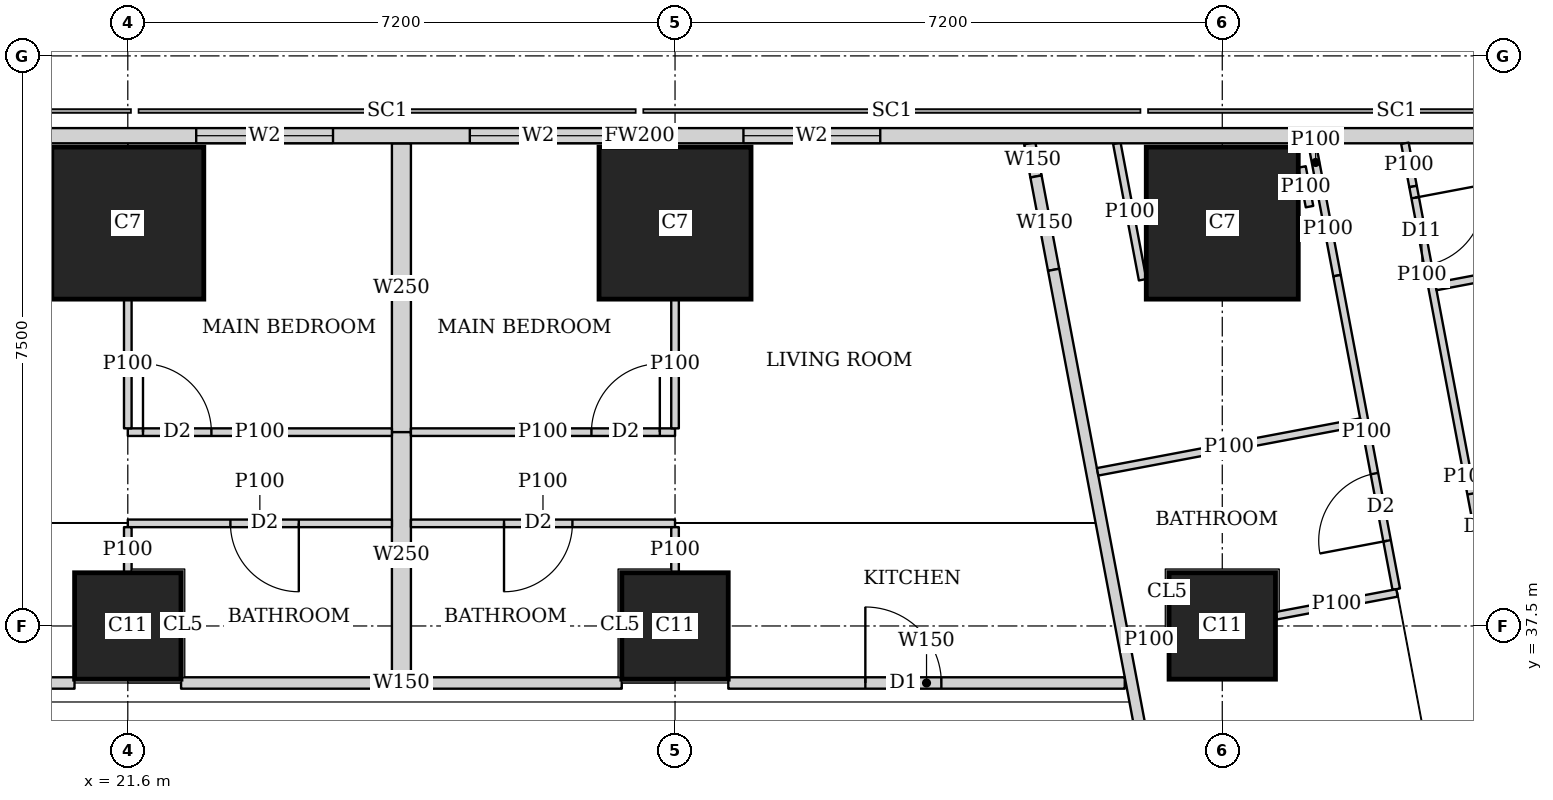
"""IFC4 building model, lengths in metres.
Left out: names, types, materials, properties, quantities, classifications, styles, units other than length and angle.
Written with IfcOpenShell. Run it as: python <this file> out.ifc"""

import sys

from ifc_helpers import new_model, si_unit, direction, frame, frame_2d, origin, origin_2d, place, context, subcontext, project, spatial, rectangle, extrude, element, fill, save


model = new_model("IFC4")
c1 = context("Model", 3, precision=1e-05, world=origin(), true_north=direction((0.0, 1.0)))
c2 = subcontext(c1, "Body", "Model", "MODEL_VIEW")
j1 = project(units=[si_unit("LENGTHUNIT", "METRE"), si_unit("PLANEANGLEUNIT", "RADIAN")], contexts=[c1])
p1 = place(None, origin())
s1 = spatial("IfcSite", under=j1, at=p1, CompositionType="ELEMENT")
p2 = place(p1, origin())
s2 = spatial("IfcBuilding", under=s1, at=p2, CompositionType="ELEMENT")
p3 = place(p2, frame((0.0, 0.0, 255.35)))
s3 = spatial("IfcBuildingStorey", under=s2, at=p3, CompositionType="ELEMENT", Elevation=255.35)
for number, where, z_axis, x_axis in (
    (1, (21.6, 37.5, 0.0), (0.0, 0.0, 1.0), (1.0, 0.0, 0.0)),
    (2, (28.8, 37.5, 0.0), (0.0, 0.0, 1.0), (1.0, 0.0, 0.0)),
    (3, (36.0, 37.5, 0.0), (0.0, 0.0, 1.0), (1.0, 0.0, 0.0)),
):
    element("IfcColumn", number, at=place(p3, frame(where, z_axis=z_axis, x_axis=x_axis)), inside=s3, PredefinedType="COLUMN", context=c2, shape_type="SweptSolid", body=[
        extrude(rectangle(XDim=1.4, YDim=1.4, at=origin_2d()), origin(), (0.0, 0.0, 1.0), 3.75),
    ])
for number, where, z_axis, x_axis in (
    (4, (21.6, 42.8, 0.0), (0.0, 0.0, 1.0), (1.0, 0.0, 0.0)),
    (5, (28.8, 42.8, 0.0), (0.0, 0.0, 1.0), (1.0, 0.0, 0.0)),
    (6, (36.0, 42.8, 0.0), (0.0, 0.0, 1.0), (1.0, 0.0, 0.0)),
):
    element("IfcColumn", number, at=place(p3, frame(where, z_axis=z_axis, x_axis=x_axis)), inside=s3, PredefinedType="COLUMN", context=c2, shape_type="SweptSolid", body=[
        extrude(rectangle(XDim=2.0, YDim=2.0, at=origin_2d()), origin(), (0.0, 0.0, 1.0), 3.75),
    ])
p4 = place(p3, frame((42.103, 43.95, 0.0), z_axis=(0.0, 0.0, 1.0), x_axis=(-1.0, 0.0, 0.0)))
e7 = element("IfcWall", 7, at=p4, inside=s3, PredefinedType="SOLIDWALL", context=c2, shape_type="SweptSolid", body=[
    extrude(rectangle(XDim=27.54, YDim=0.2, at=frame_2d((13.77, 0.0))), origin(), (0.0, 0.0, 1.0), 3.5),
])
p5 = place(p4, frame((10.603, 0.0, 0.9)))
e8 = element("IfcOpeningElement", 8, at=p5, cuts=e7, PredefinedType="OPENING", context=c2, shape_type="SweptSolid", body=[
    extrude(rectangle(XDim=1.8, YDim=1.5, at=frame_2d((0.9, 0.75))), frame((0.0, 0.11, 0.0), z_axis=(0.0, -1.0, 0.0), x_axis=(1.0, 0.0, 0.0)), (0.0, 0.0, 1.0), 0.22),
])
p6 = place(p4, frame((14.203, 0.0, 0.9)))
e9 = element("IfcOpeningElement", 9, at=p6, cuts=e7, PredefinedType="OPENING", context=c2, shape_type="SweptSolid", body=[
    extrude(rectangle(XDim=1.8, YDim=1.5, at=frame_2d((0.9, 0.75))), frame((0.0, 0.11, 0.0), z_axis=(0.0, -1.0, 0.0), x_axis=(1.0, 0.0, 0.0)), (0.0, 0.0, 1.0), 0.22),
])
p7 = place(p4, frame((17.803, 0.0, 0.9)))
e10 = element("IfcOpeningElement", 10, at=p7, cuts=e7, PredefinedType="OPENING", context=c2, shape_type="SweptSolid", body=[
    extrude(rectangle(XDim=1.8, YDim=1.5, at=frame_2d((0.9, 0.75))), frame((0.0, 0.11, 0.0), z_axis=(0.0, -1.0, 0.0), x_axis=(1.0, 0.0, 0.0)), (0.0, 0.0, 1.0), 0.22),
])
p8 = place(p4, frame((22.822, 0.0, 0.9)))
e11 = element("IfcOpeningElement", 11, at=p8, cuts=e7, PredefinedType="OPENING", context=c2, shape_type="SweptSolid", body=[
    extrude(rectangle(XDim=2.4, YDim=1.5, at=frame_2d((1.2, 0.75))), frame((0.0, 0.11, 0.0), z_axis=(0.0, -1.0, 0.0), x_axis=(1.0, 0.0, 0.0)), (0.0, 0.0, 1.0), 0.22),
])
p9 = place(p3, frame((16.001, 36.75, 0.0), z_axis=(0.0, 0.0, 1.0), x_axis=(1.0, 0.0, 0.0)))
e12 = element("IfcWall", 12, at=p9, inside=s3, PredefinedType="SOLIDWALL", context=c2, shape_type="SweptSolid", body=[
    extrude(rectangle(XDim=4.898, YDim=0.15, at=frame_2d((2.449, 0.0))), origin(), (0.0, 0.0, 1.0), 3.5),
])
p10 = place(p9, frame((1.074, 0.0, 0.0)))
e13 = element("IfcOpeningElement", 13, at=p10, cuts=e12, PredefinedType="OPENING", context=c2, shape_type="SweptSolid", body=[
    extrude(rectangle(XDim=1.0, YDim=2.1, at=frame_2d((0.5, 1.05))), frame((0.0, 0.085, 0.0), z_axis=(0.0, -1.0, 0.0), x_axis=(1.0, 0.0, 0.0)), (0.0, 0.0, 1.0), 0.17),
])
p11 = place(p3, frame((22.301, 36.75, 0.0), z_axis=(0.0, 0.0, 1.0), x_axis=(1.0, 0.0, 0.0)))
e14 = element("IfcWall", 14, at=p11, inside=s3, PredefinedType="SOLIDWALL", context=c2, shape_type="SweptSolid", body=[
    extrude(rectangle(XDim=5.798, YDim=0.15, at=frame_2d((2.899, 0.0))), origin(), (0.0, 0.0, 1.0), 3.5),
])
p12 = place(p3, frame((29.501, 36.75, 0.0), z_axis=(0.0, 0.0, 1.0), x_axis=(1.0, 0.0, 0.0)))
e15 = element("IfcWall", 15, at=p12, inside=s3, PredefinedType="SOLIDWALL", context=c2, shape_type="SweptSolid", body=[
    extrude(rectangle(XDim=5.216, YDim=0.15, at=frame_2d((2.608, 0.0))), origin(), (0.0, 0.0, 1.0), 3.5),
])
p13 = place(p12, frame((1.803, 0.0, 0.0)))
e16 = element("IfcOpeningElement", 16, at=p13, cuts=e15, PredefinedType="OPENING", context=c2, shape_type="SweptSolid", body=[
    extrude(rectangle(XDim=1.0, YDim=2.1, at=frame_2d((0.5, 1.05))), frame((0.0, 0.085, 0.0), z_axis=(0.0, -1.0, 0.0), x_axis=(1.0, 0.0, 0.0)), (0.0, 0.0, 1.0), 0.17),
])
p14 = place(p3, frame((33.467, 43.85, 0.0), z_axis=(0.0, 0.0, 1.0), x_axis=(0.184886516626, -0.982759877066, 0.0)))
e17 = element("IfcWall", 17, at=p14, inside=s3, PredefinedType="SOLIDWALL", context=c2, shape_type="SweptSolid", body=[
    extrude(rectangle(XDim=0.444, YDim=0.15, at=frame_2d((0.222, 0.0))), origin(), (0.0, 0.0, 1.0), 3.5),
])
p15 = place(p3, frame((33.549, 43.414, 0.0), z_axis=(0.0, 0.0, 1.0), x_axis=(0.185585816539, -0.982628060204, 0.0)))
e18 = element("IfcWall", 18, at=p15, inside=s3, PredefinedType="SOLIDWALL", context=c2, shape_type="SweptSolid", body=[
    extrude(rectangle(XDim=1.25, YDim=0.15, at=frame_2d((0.625, 0.0))), origin(), (0.0, 0.0, 1.0), 2.05),
])
p16 = place(p3, frame((33.781, 42.186, 0.0), z_axis=(0.0, 0.0, 1.0), x_axis=(0.185593518645, -0.9826266055, 0.0)))
e19 = element("IfcWall", 19, at=p16, inside=s3, PredefinedType="SOLIDWALL", context=c2, shape_type="SweptSolid", body=[
    extrude(rectangle(XDim=35.961, YDim=0.15, at=frame_2d((17.98, 0.0))), origin(), (0.0, 0.0, 1.0), 2.5),
])
p17 = place(p16, frame((7.183, 0.0, 0.0)))
e20 = element("IfcOpeningElement", 20, at=p17, cuts=e19, PredefinedType="OPENING", context=c2, shape_type="SweptSolid", body=[
    extrude(rectangle(XDim=1.0, YDim=2.1, at=frame_2d((0.5, 1.05))), frame((0.0, 0.085, 0.0), z_axis=(0.0, -1.0, 0.0), x_axis=(1.0, 0.0, 0.0)), (0.0, 0.0, 1.0), 0.17),
])
p18 = place(p16, frame((11.76, 0.0, 0.0)))
e21 = element("IfcOpeningElement", 21, at=p18, cuts=e19, PredefinedType="OPENING", context=c2, shape_type="SweptSolid", body=[
    extrude(rectangle(XDim=1.0, YDim=2.1, at=frame_2d((0.5, 1.05))), frame((0.0, 0.085, 0.0), z_axis=(0.0, -1.0, 0.0), x_axis=(1.0, 0.0, 0.0)), (0.0, 0.0, 1.0), 0.17),
])
p19 = place(p16, frame((23.863, 0.0, 0.0)))
e22 = element("IfcOpeningElement", 22, at=p19, cuts=e19, PredefinedType="OPENING", context=c2, shape_type="SweptSolid", body=[
    extrude(rectangle(XDim=1.0, YDim=2.1, at=frame_2d((0.5, 1.05))), frame((0.0, 0.085, 0.0), z_axis=(0.0, -1.0, 0.0), x_axis=(1.0, 0.0, 0.0)), (0.0, 0.0, 1.0), 0.17),
])
p20 = place(p16, frame((30.502, 0.0, 0.0)))
e23 = element("IfcOpeningElement", 23, at=p20, cuts=e19, PredefinedType="OPENING", context=c2, shape_type="SweptSolid", body=[
    extrude(rectangle(XDim=1.0, YDim=2.1, at=frame_2d((0.5, 1.05))), frame((0.0, 0.085, 0.0), z_axis=(0.0, -1.0, 0.0), x_axis=(1.0, 0.0, 0.0)), (0.0, 0.0, 1.0), 0.17),
])
p21 = place(p3, frame((34.952, 42.055, 0.0), z_axis=(0.0, 0.0, 1.0), x_axis=(-0.185490642006, 0.98264603074, 0.0)))
e24 = element("IfcWall", 24, at=p21, inside=s3, PredefinedType="PARTITIONING", context=c2, shape_type="SweptSolid", body=[
    extrude(rectangle(XDim=1.827, YDim=0.1, at=frame_2d((0.914, 0.0))), origin(), (0.0, 0.0, 1.0), 2.05),
])
p22 = place(p3, frame((37.049, 43.539, 0.0), z_axis=(0.0, 0.0, 1.0), x_axis=(0.186119495745, -0.982527115811, 0.0)))
e25 = element("IfcWall", 25, at=p22, inside=s3, PredefinedType="PARTITIONING", context=c2, shape_type="SweptSolid", body=[
    extrude(rectangle(XDim=0.531, YDim=0.1, at=frame_2d((0.266, 0.0))), origin(), (0.0, 0.0, 1.0), 2.05),
])
p23 = place(p3, frame((38.403, 43.85, 0.0), z_axis=(0.0, 0.0, 1.0), x_axis=(0.184976954078, -0.982742858768, 0.0)))
e26 = element("IfcWall", 26, at=p23, inside=s3, PredefinedType="PARTITIONING", context=c2, shape_type="SweptSolid", body=[
    extrude(rectangle(XDim=0.578, YDim=0.1, at=frame_2d((0.289, 0.0))), origin(), (0.0, 0.0, 1.0), 3.5),
])
p24 = place(p3, frame((38.51, 43.282, 0.0), z_axis=(0.0, 0.0, 1.0), x_axis=(0.185775287495, -0.982592256511, 0.0)))
e27 = element("IfcWall", 27, at=p24, inside=s3, PredefinedType="PARTITIONING", context=c2, shape_type="SweptSolid", body=[
    extrude(rectangle(XDim=1.259, YDim=0.1, at=frame_2d((0.629, 0.0))), origin(), (0.0, 0.0, 1.0), 2.05),
])
p25 = place(p24, frame((0.15, 0.0, 0.0)))
e28 = element("IfcOpeningElement", 28, at=p25, cuts=e27, PredefinedType="OPENING", context=c2, shape_type="SweptSolid", body=[
    extrude(rectangle(XDim=0.9, YDim=2.0, at=frame_2d((0.45, 1.0))), frame((0.0, 0.06, 0.0), z_axis=(0.0, -1.0, 0.0), x_axis=(1.0, 0.0, 0.0)), (0.0, 0.0, 1.0), 0.12),
])
p26 = place(p3, frame((38.744, 42.045, 0.0), z_axis=(0.0, 0.0, 1.0), x_axis=(0.185564988614, -0.982631993679, 0.0)))
e29 = element("IfcWall", 29, at=p26, inside=s3, PredefinedType="PARTITIONING", context=c2, shape_type="SweptSolid", body=[
    extrude(rectangle(XDim=5.265, YDim=0.1, at=frame_2d((2.633, 0.0))), origin(), (0.0, 0.0, 1.0), 3.5),
])
p27 = place(p26, frame((2.856, 0.0, 0.0)))
e30 = element("IfcOpeningElement", 30, at=p27, cuts=e29, PredefinedType="OPENING", context=c2, shape_type="SweptSolid", body=[
    extrude(rectangle(XDim=0.9, YDim=2.1, at=frame_2d((0.45, 1.05))), frame((0.0, 0.06, 0.0), z_axis=(0.0, -1.0, 0.0), x_axis=(1.0, 0.0, 0.0)), (0.0, 0.0, 1.0), 0.12),
])
p28 = place(p3, frame((37.181, 43.85, 0.0), z_axis=(0.0, 0.0, 1.0), x_axis=(0.185121727606, -0.982715597703, 0.0)))
e31 = element("IfcWall", 31, at=p28, inside=s3, PredefinedType="PARTITIONING", context=c2, shape_type="SweptSolid", body=[
    extrude(rectangle(XDim=0.513, YDim=0.1, at=frame_2d((0.256, 0.0))), origin(), (0.0, 0.0, 1.0), 3.5),
])
p29 = place(p3, frame((37.276, 43.346, 0.0), z_axis=(0.0, 0.0, 1.0), x_axis=(0.185962504646, -0.982556841544, 0.0)))
e32 = element("IfcWall", 32, at=p29, inside=s3, PredefinedType="PARTITIONING", context=c2, shape_type="SweptSolid", body=[
    extrude(rectangle(XDim=1.259, YDim=0.1, at=frame_2d((0.629, 0.0))), origin(), (0.0, 0.0, 1.0), 2.05),
])
p30 = place(p3, frame((37.51, 42.109, 0.0), z_axis=(0.0, 0.0, 1.0), x_axis=(0.185580569503, -0.98262905118, 0.0)))
e33 = element("IfcWall", 33, at=p30, inside=s3, PredefinedType="PARTITIONING", context=c2, shape_type="SweptSolid", body=[
    extrude(rectangle(XDim=4.198, YDim=0.1, at=frame_2d((2.099, 0.0))), origin(), (0.0, 0.0, 1.0), 3.5),
])
p31 = place(p30, frame((2.65, 0.0, 0.0)))
e34 = element("IfcOpeningElement", 34, at=p31, cuts=e33, PredefinedType="OPENING", context=c2, shape_type="SweptSolid", body=[
    extrude(rectangle(XDim=0.9, YDim=2.1, at=frame_2d((0.45, 1.05))), frame((0.0, 0.06, 0.0), z_axis=(0.0, -1.0, 0.0), x_axis=(1.0, 0.0, 0.0)), (0.0, 0.0, 1.0), 0.12),
])
p32 = place(p3, frame((40.657, 42.315, 0.0), z_axis=(0.0, 0.0, 1.0), x_axis=(-0.982622785543, -0.185613742305, 0.0)))
e35 = element("IfcWall", 35, at=p32, inside=s3, PredefinedType="PARTITIONING", context=c2, shape_type="SweptSolid", body=[
    extrude(rectangle(XDim=1.88, YDim=0.1, at=frame_2d((0.94, 0.0))), origin(), (0.0, 0.0, 1.0), 2.05),
])
p33 = place(p3, frame((37.823, 40.182, 0.0), z_axis=(0.0, 0.0, 1.0), x_axis=(-0.98263926043, -0.185526504472, 0.0)))
e36 = element("IfcWall", 36, at=p33, inside=s3, PredefinedType="PARTITIONING", context=c2, shape_type="SweptSolid", body=[
    extrude(rectangle(XDim=3.524, YDim=0.1, at=frame_2d((1.762, 0.0))), origin(), (0.0, 0.0, 1.0), 3.5),
])
p34 = place(p3, frame((38.299, 37.935, 0.0), z_axis=(0.0, 0.0, 1.0), x_axis=(-0.98263725405, -0.185537130931, 0.0)))
e37 = element("IfcWall", 37, at=p34, inside=s3, PredefinedType="PARTITIONING", context=c2, shape_type="SweptSolid", body=[
    extrude(rectangle(XDim=1.617, YDim=0.1, at=frame_2d((0.809, 0.0))), origin(), (0.0, 0.0, 1.0), 3.5),
])
p35 = place(p3, frame((35.29, 37.366, 0.0), z_axis=(0.0, 0.0, 1.0), x_axis=(-0.982715597703, -0.185121727606, 0.0)))
e38 = element("IfcWall", 38, at=p35, inside=s3, PredefinedType="PARTITIONING", context=c2, shape_type="SweptSolid", body=[
    extrude(rectangle(XDim=0.513, YDim=0.1, at=frame_2d((0.256, 0.0))), origin(), (0.0, 0.0, 1.0), 3.5),
])
p36 = place(p3, frame((21.6, 40.05, 0.0), z_axis=(0.0, 0.0, 1.0), x_axis=(1.0, 0.0, 0.0)))
e39 = element("IfcWall", 39, at=p36, inside=s3, PredefinedType="PARTITIONING", context=c2, shape_type="SweptSolid", body=[
    extrude(rectangle(XDim=3.475, YDim=0.1, at=frame_2d((1.737, 0.0))), origin(), (0.0, 0.0, 1.0), 3.5),
])
p37 = place(p36, frame((0.2, 0.0, 0.0)))
e40 = element("IfcOpeningElement", 40, at=p37, cuts=e39, PredefinedType="OPENING", context=c2, shape_type="SweptSolid", body=[
    extrude(rectangle(XDim=0.9, YDim=2.1, at=frame_2d((0.45, 1.05))), frame((0.0, 0.06, 0.0), z_axis=(0.0, -1.0, 0.0), x_axis=(1.0, 0.0, 0.0)), (0.0, 0.0, 1.0), 0.12),
])
p38 = place(p3, frame((21.6, 38.85, 0.0), z_axis=(0.0, 0.0, 1.0), x_axis=(1.0, 0.0, 0.0)))
e41 = element("IfcWall", 41, at=p38, inside=s3, PredefinedType="PARTITIONING", context=c2, shape_type="SweptSolid", body=[
    extrude(rectangle(XDim=3.475, YDim=0.1, at=frame_2d((1.737, 0.0))), origin(), (0.0, 0.0, 1.0), 3.5),
])
p39 = place(p38, frame((1.35, 0.0, 0.0)))
e42 = element("IfcOpeningElement", 42, at=p39, cuts=e41, PredefinedType="OPENING", context=c2, shape_type="SweptSolid", body=[
    extrude(rectangle(XDim=0.9, YDim=2.1, at=frame_2d((0.45, 1.05))), frame((0.0, 0.06, 0.0), z_axis=(0.0, -1.0, 0.0), x_axis=(1.0, 0.0, 0.0)), (0.0, 0.0, 1.0), 0.12),
])
p40 = place(p3, frame((21.6, 40.1, 0.0), z_axis=(0.0, 0.0, 1.0), x_axis=(0.0, 1.0, 0.0)))
e43 = element("IfcWall", 43, at=p40, inside=s3, PredefinedType="PARTITIONING", context=c2, shape_type="SweptSolid", body=[
    extrude(rectangle(XDim=1.699, YDim=0.1, at=frame_2d((0.85, 0.0))), origin(), (0.0, 0.0, 1.0), 3.5),
])
p41 = place(p3, frame((21.6, 38.201, 0.0), z_axis=(0.0, 0.0, 1.0), x_axis=(0.0, 1.0, 0.0)))
e44 = element("IfcWall", 44, at=p41, inside=s3, PredefinedType="PARTITIONING", context=c2, shape_type="SweptSolid", body=[
    extrude(rectangle(XDim=0.599, YDim=0.1, at=frame_2d((0.3, 0.0))), origin(), (0.0, 0.0, 1.0), 3.5),
])
p42 = place(p3, frame((25.325, 40.05, 0.0), z_axis=(0.0, 0.0, 1.0), x_axis=(1.0, 0.0, 0.0)))
e45 = element("IfcWall", 45, at=p42, inside=s3, PredefinedType="PARTITIONING", context=c2, shape_type="SweptSolid", body=[
    extrude(rectangle(XDim=3.475, YDim=0.1, at=frame_2d((1.738, 0.0))), origin(), (0.0, 0.0, 1.0), 3.5),
])
p43 = place(p42, frame((2.375, 0.0, 0.0)))
e46 = element("IfcOpeningElement", 46, at=p43, cuts=e45, PredefinedType="OPENING", context=c2, shape_type="SweptSolid", body=[
    extrude(rectangle(XDim=0.9, YDim=2.1, at=frame_2d((0.45, 1.05))), frame((0.0, 0.06, 0.0), z_axis=(0.0, -1.0, 0.0), x_axis=(1.0, 0.0, 0.0)), (0.0, 0.0, 1.0), 0.12),
])
p44 = place(p3, frame((25.325, 38.85, 0.0), z_axis=(0.0, 0.0, 1.0), x_axis=(1.0, 0.0, 0.0)))
e47 = element("IfcWall", 47, at=p44, inside=s3, PredefinedType="PARTITIONING", context=c2, shape_type="SweptSolid", body=[
    extrude(rectangle(XDim=3.475, YDim=0.1, at=frame_2d((1.738, 0.0))), origin(), (0.0, 0.0, 1.0), 3.5),
])
p45 = place(p44, frame((1.225, 0.0, 0.0)))
e48 = element("IfcOpeningElement", 48, at=p45, cuts=e47, PredefinedType="OPENING", context=c2, shape_type="SweptSolid", body=[
    extrude(rectangle(XDim=0.9, YDim=2.1, at=frame_2d((0.45, 1.05))), frame((0.0, 0.06, 0.0), z_axis=(0.0, -1.0, 0.0), x_axis=(1.0, 0.0, 0.0)), (0.0, 0.0, 1.0), 0.12),
])
p46 = place(p3, frame((28.8, 40.1, 0.0), z_axis=(0.0, 0.0, 1.0), x_axis=(0.0, 1.0, 0.0)))
e49 = element("IfcWall", 49, at=p46, inside=s3, PredefinedType="PARTITIONING", context=c2, shape_type="SweptSolid", body=[
    extrude(rectangle(XDim=1.699, YDim=0.1, at=frame_2d((0.85, 0.0))), origin(), (0.0, 0.0, 1.0), 3.5),
])
p47 = place(p3, frame((28.8, 38.201, 0.0), z_axis=(0.0, 0.0, 1.0), x_axis=(0.0, 1.0, 0.0)))
e50 = element("IfcWall", 50, at=p47, inside=s3, PredefinedType="PARTITIONING", context=c2, shape_type="SweptSolid", body=[
    extrude(rectangle(XDim=0.599, YDim=0.1, at=frame_2d((0.3, 0.0))), origin(), (0.0, 0.0, 1.0), 3.5),
])
p48 = place(p3, frame((25.2, 40.05, 0.0), z_axis=(0.0, 0.0, 1.0), x_axis=(0.0, 1.0, 0.0)))
e51 = element("IfcWall", 51, at=p48, inside=s3, PredefinedType="SOLIDWALL", context=c2, shape_type="SweptSolid", body=[
    extrude(rectangle(XDim=3.8, YDim=0.25, at=frame_2d((1.9, 0.0))), origin(), (0.0, 0.0, 1.0), 2.05),
])
p49 = place(p3, frame((25.2, 36.825, 0.0), z_axis=(0.0, 0.0, 1.0), x_axis=(0.0, 1.0, 0.0)))
e52 = element("IfcWall", 52, at=p49, inside=s3, PredefinedType="SOLIDWALL", context=c2, shape_type="SweptSolid", body=[
    extrude(rectangle(XDim=3.225, YDim=0.25, at=frame_2d((1.613, 0.0))), origin(), (0.0, 0.0, 1.0), 3.5),
])
p50 = place(p5, origin())
e53 = element("IfcWindow", 53, at=p50, inside=s3, PartitioningType="SINGLE_PANEL", PredefinedType="WINDOW", context=c2, shape_type="SweptSolid", body=[
    extrude(rectangle(XDim=1.8, YDim=1.5, at=frame_2d((0.9, 0.75))), frame((0.0, 0.03, 0.0), z_axis=(0.0, -1.0, 0.0), x_axis=(1.0, 0.0, 0.0)), (0.0, 0.0, 1.0), 0.06),
])
fill(e8, e53)
p51 = place(p6, origin())
e54 = element("IfcWindow", 54, at=p51, inside=s3, PartitioningType="SINGLE_PANEL", PredefinedType="WINDOW", context=c2, shape_type="SweptSolid", body=[
    extrude(rectangle(XDim=1.8, YDim=1.5, at=frame_2d((0.9, 0.75))), frame((0.0, 0.03, 0.0), z_axis=(0.0, -1.0, 0.0), x_axis=(1.0, 0.0, 0.0)), (0.0, 0.0, 1.0), 0.06),
])
fill(e9, e54)
p52 = place(p7, origin())
e55 = element("IfcWindow", 55, at=p52, inside=s3, PartitioningType="SINGLE_PANEL", PredefinedType="WINDOW", context=c2, shape_type="SweptSolid", body=[
    extrude(rectangle(XDim=1.8, YDim=1.5, at=frame_2d((0.9, 0.75))), frame((0.0, 0.03, 0.0), z_axis=(0.0, -1.0, 0.0), x_axis=(1.0, 0.0, 0.0)), (0.0, 0.0, 1.0), 0.06),
])
fill(e10, e55)
p53 = place(p25, origin())
e56 = element("IfcDoor", 56, at=p53, inside=s3, OperationType="SINGLE_SWING_LEFT", PredefinedType="DOOR", context=c2, shape_type="SweptSolid", body=[
    extrude(rectangle(XDim=0.9, YDim=2.0, at=frame_2d((0.45, 1.0))), frame((0.0, 0.025, 0.0), z_axis=(0.0, -1.0, 0.0), x_axis=(1.0, 0.0, 0.0)), (0.0, 0.0, 1.0), 0.05),
])
fill(e28, e56)
p54 = place(p27, origin())
e57 = element("IfcDoor", 57, at=p54, inside=s3, OperationType="SINGLE_SWING_RIGHT", PredefinedType="DOOR", context=c2, shape_type="SweptSolid", body=[
    extrude(rectangle(XDim=0.9, YDim=2.1, at=frame_2d((0.45, 1.05))), frame((0.0, 0.025, 0.0), z_axis=(0.0, -1.0, 0.0), x_axis=(1.0, 0.0, 0.0)), (0.0, 0.0, 1.0), 0.05),
])
fill(e30, e57)
p55 = place(p31, origin())
e58 = element("IfcDoor", 58, at=p55, inside=s3, OperationType="SINGLE_SWING_LEFT", PredefinedType="DOOR", context=c2, shape_type="SweptSolid", body=[
    extrude(rectangle(XDim=0.9, YDim=2.1, at=frame_2d((0.45, 1.05))), frame((0.0, 0.025, 0.0), z_axis=(0.0, -1.0, 0.0), x_axis=(1.0, 0.0, 0.0)), (0.0, 0.0, 1.0), 0.05),
])
fill(e34, e58)
p56 = place(p37, origin())
e59 = element("IfcDoor", 59, at=p56, inside=s3, OperationType="SINGLE_SWING_LEFT", PredefinedType="DOOR", context=c2, shape_type="SweptSolid", body=[
    extrude(rectangle(XDim=0.9, YDim=2.1, at=frame_2d((0.45, 1.05))), frame((0.0, 0.025, 0.0), z_axis=(0.0, -1.0, 0.0), x_axis=(1.0, 0.0, 0.0)), (0.0, 0.0, 1.0), 0.05),
])
fill(e40, e59)
p57 = place(p39, origin())
e60 = element("IfcDoor", 60, at=p57, inside=s3, OperationType="SINGLE_SWING_LEFT", PredefinedType="DOOR", context=c2, shape_type="SweptSolid", body=[
    extrude(rectangle(XDim=0.9, YDim=2.1, at=frame_2d((0.45, 1.05))), frame((0.0, 0.025, 0.0), z_axis=(0.0, -1.0, 0.0), x_axis=(1.0, 0.0, 0.0)), (0.0, 0.0, 1.0), 0.05),
])
fill(e42, e60)
p58 = place(p43, origin())
e61 = element("IfcDoor", 61, at=p58, inside=s3, OperationType="SINGLE_SWING_RIGHT", PredefinedType="DOOR", context=c2, shape_type="SweptSolid", body=[
    extrude(rectangle(XDim=0.9, YDim=2.1, at=frame_2d((0.45, 1.05))), frame((0.0, 0.025, 0.0), z_axis=(0.0, -1.0, 0.0), x_axis=(1.0, 0.0, 0.0)), (0.0, 0.0, 1.0), 0.05),
])
fill(e46, e61)
p59 = place(p45, origin())
e62 = element("IfcDoor", 62, at=p59, inside=s3, OperationType="SINGLE_SWING_RIGHT", PredefinedType="DOOR", context=c2, shape_type="SweptSolid", body=[
    extrude(rectangle(XDim=0.9, YDim=2.1, at=frame_2d((0.45, 1.05))), frame((0.0, 0.025, 0.0), z_axis=(0.0, -1.0, 0.0), x_axis=(1.0, 0.0, 0.0)), (0.0, 0.0, 1.0), 0.05),
])
fill(e48, e62)
p60 = place(p13, origin())
e63 = element("IfcDoor", 63, at=p60, inside=s3, OperationType="SINGLE_SWING_LEFT", PredefinedType="DOOR", context=c2, shape_type="SweptSolid", body=[
    extrude(rectangle(XDim=1.0, YDim=2.1, at=frame_2d((0.5, 1.05))), frame((0.0, 0.025, 0.0), z_axis=(0.0, -1.0, 0.0), x_axis=(1.0, 0.0, 0.0)), (0.0, 0.0, 1.0), 0.05),
])
fill(e16, e63)
save(model, sys.argv[1])
